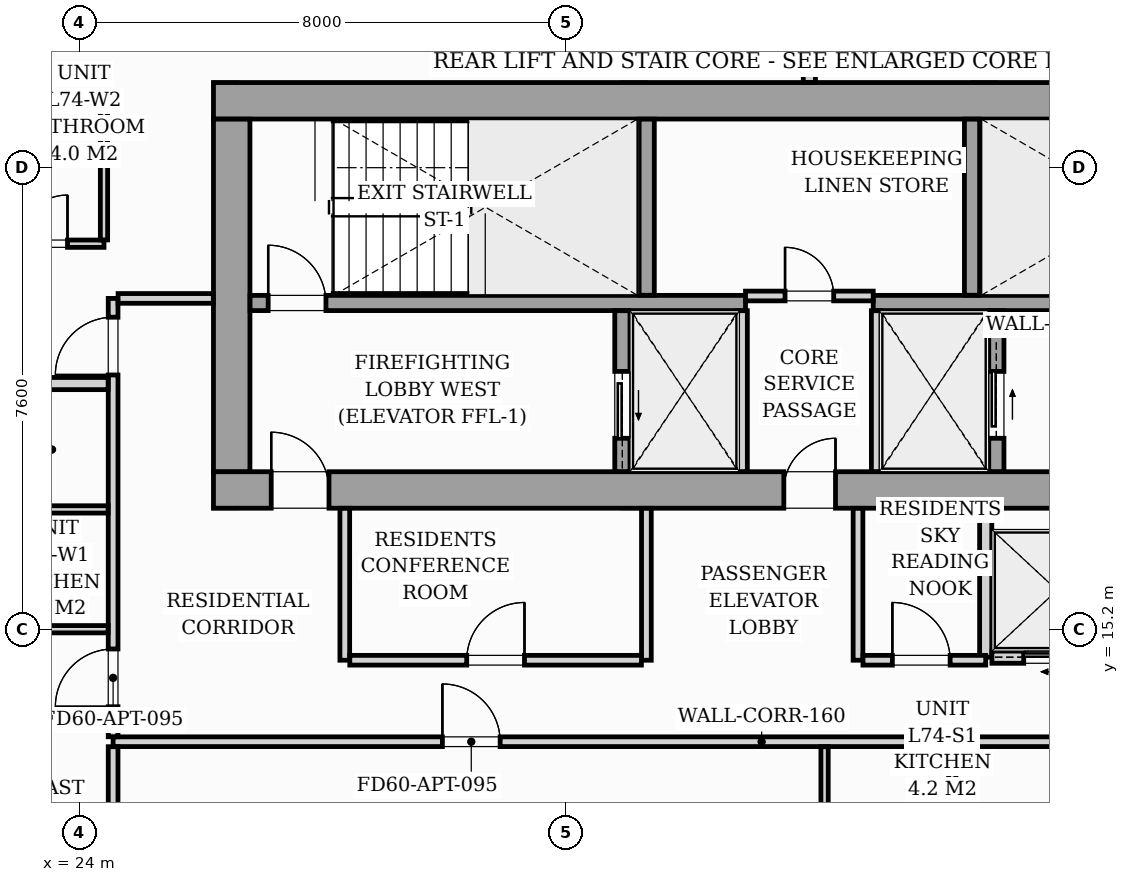
"""IFC4 building model, lengths in metres.
Left out: names, types, materials, properties, quantities, classifications, styles, units other than length and angle.
Written with IfcOpenShell. Run it as: python <this file> out.ifc"""

import sys

from ifc_helpers import new_model, si_unit, direction, frame, frame_2d, origin, origin_2d, place, context, subcontext, project, spatial, rectangle, i_section, extrude, source, transform, mapped, element, fill, save


model = new_model("IFC4")
c1 = context("Model", 3, precision=1e-05, world=origin(), true_north=direction((0.0, 1.0)))
c2 = subcontext(c1, "Body", "Model", "MODEL_VIEW")
j1 = project(units=[si_unit("LENGTHUNIT", "METRE"), si_unit("PLANEANGLEUNIT", "RADIAN")], contexts=[c1])
p1 = place(None, origin())
s1 = spatial("IfcSite", under=j1, at=p1, CompositionType="ELEMENT")
p2 = place(p1, origin())
s2 = spatial("IfcBuilding", under=s1, at=p2, CompositionType="ELEMENT")
p3 = place(p2, frame((0.0, 0.0, 256.2)))
s3 = spatial("IfcBuildingStorey", under=s2, at=p3, CompositionType="ELEMENT", Elevation=256.2)
m1 = source(origin(), c2, "Body", "SweptSolid", [
    extrude(i_section(OverallWidth=0.409, OverallDepth=0.425, WebThickness=0.033, FlangeThickness=0.052, FilletRadius=0.018, at=origin_2d()), origin(), (0.0, 0.0, 1.0), 3.296),
])
for number, where, z_axis, x_axis in (
    (1, (26.4, 17.4, 0.002), (0.0, 0.0, 1.0), (1.0, 0.0, 0.0)),
    (2, (33.12, 17.4, 0.002), (0.0, 0.0, 1.0), (1.0, 0.0, 0.0)),
    (3, (38.88, 17.4, 0.002), (0.0, 0.0, 1.0), (1.0, 0.0, 0.0)),
    (4, (26.4, 24.0, 0.002), (0.0, 0.0, 1.0), (1.0, 0.0, 0.0)),
    (5, (33.12, 24.0, 0.002), (0.0, 0.0, 1.0), (1.0, 0.0, 0.0)),
    (6, (38.88, 24.0, 0.002), (0.0, 0.0, 1.0), (1.0, 0.0, 0.0)),
):
    element("IfcColumn", number, at=place(p3, frame(where, z_axis=z_axis, x_axis=x_axis)), inside=s3, PredefinedType="PILASTER", context=c2, shape_type="MappedRepresentation", body=[
        mapped(m1, transform((0.0, 0.0, 0.0), scale=1.0)),
    ])
p4 = place(p3, frame((26.2, 17.5, 0.0), z_axis=(0.0, 0.0, 1.0), x_axis=(1.0, 0.0, 0.0)))
e7 = element("IfcWall", 7, at=p4, inside=s3, PredefinedType="SHEAR", context=c2, shape_type="SweptSolid", body=[
    extrude(rectangle(XDim=19.6, YDim=0.6, at=frame_2d((9.8, 0.0))), origin(), (0.0, 0.0, 1.0), 3.3),
])
p5 = place(p4, frame((0.95, 0.0, 0.0)))
e8 = element("IfcOpeningElement", 8, at=p5, cuts=e7, PredefinedType="OPENING", context=c2, shape_type="SweptSolid", body=[
    extrude(rectangle(XDim=0.95, YDim=2.06, at=frame_2d((0.475, 1.03))), frame((0.0, 0.31, 0.0), z_axis=(0.0, -1.0, 0.0), x_axis=(1.0, 0.0, 0.0)), (0.0, 0.0, 1.0), 0.62),
])
p6 = place(p4, frame((9.38, 0.0, 0.0)))
e9 = element("IfcOpeningElement", 9, at=p6, cuts=e7, PredefinedType="OPENING", context=c2, shape_type="SweptSolid", body=[
    extrude(rectangle(XDim=0.85, YDim=2.0, at=frame_2d((0.425, 1.0))), frame((0.0, 0.31, 0.0), z_axis=(0.0, -1.0, 0.0), x_axis=(1.0, 0.0, 0.0)), (0.0, 0.0, 1.0), 0.62),
])
p7 = place(p4, frame((17.55, 0.0, 0.0)))
e10 = element("IfcOpeningElement", 10, at=p7, cuts=e7, PredefinedType="OPENING", context=c2, shape_type="SweptSolid", body=[
    extrude(rectangle(XDim=0.95, YDim=2.06, at=frame_2d((0.475, 1.03))), frame((0.0, 0.31, 0.0), z_axis=(0.0, -1.0, 0.0), x_axis=(1.0, 0.0, 0.0)), (0.0, 0.0, 1.0), 0.62),
])
p8 = place(p3, frame((26.2, 23.9, 0.0), z_axis=(0.0, 0.0, 1.0), x_axis=(1.0, 0.0, 0.0)))
e11 = element("IfcWall", 11, at=p8, inside=s3, PredefinedType="SHEAR", context=c2, shape_type="SweptSolid", body=[
    extrude(rectangle(XDim=19.6, YDim=0.6, at=frame_2d((9.8, 0.0))), origin(), (0.0, 0.0, 1.0), 3.3),
])
p9 = place(p3, frame((26.5, 17.802, 0.0), z_axis=(0.0, 0.0, 1.0), x_axis=(0.0, 1.0, 0.0)))
e12 = element("IfcWall", 12, at=p9, inside=s3, PredefinedType="SHEAR", context=c2, shape_type="SweptSolid", body=[
    extrude(rectangle(XDim=5.796, YDim=0.6, at=frame_2d((2.898, 0.0))), origin(), (0.0, 0.0, 1.0), 3.3),
])
p10 = place(p3, frame((26.802, 20.575, 0.0), z_axis=(0.0, 0.0, 1.0), x_axis=(1.0, 0.0, 0.0)))
e13 = element("IfcWall", 13, at=p10, inside=s3, PredefinedType="SOLIDWALL", context=c2, shape_type="SweptSolid", body=[
    extrude(rectangle(XDim=8.148, YDim=0.25, at=frame_2d((4.074, 0.0))), origin(), (0.0, 0.0, 1.0), 3.3),
])
p11 = place(p10, frame((0.298, 0.0, 0.0)))
e14 = element("IfcOpeningElement", 14, at=p11, cuts=e13, PredefinedType="OPENING", context=c2, shape_type="SweptSolid", body=[
    extrude(rectangle(XDim=0.95, YDim=2.06, at=frame_2d((0.475, 1.03))), frame((0.0, 0.135, 0.0), z_axis=(0.0, -1.0, 0.0), x_axis=(1.0, 0.0, 0.0)), (0.0, 0.0, 1.0), 0.27),
])
p12 = place(p3, frame((37.05, 20.575, 0.0), z_axis=(0.0, 0.0, 1.0), x_axis=(1.0, 0.0, 0.0)))
e15 = element("IfcWall", 15, at=p12, inside=s3, PredefinedType="SOLIDWALL", context=c2, shape_type="SweptSolid", body=[
    extrude(rectangle(XDim=8.148, YDim=0.25, at=frame_2d((4.074, 0.0))), origin(), (0.0, 0.0, 1.0), 3.3),
])
p13 = place(p12, frame((6.6, 0.0, 0.0)))
e16 = element("IfcOpeningElement", 16, at=p13, cuts=e15, PredefinedType="OPENING", context=c2, shape_type="SweptSolid", body=[
    extrude(rectangle(XDim=0.95, YDim=2.06, at=frame_2d((0.475, 1.03))), frame((0.0, 0.135, 0.0), z_axis=(0.0, -1.0, 0.0), x_axis=(1.0, 0.0, 0.0)), (0.0, 0.0, 1.0), 0.27),
])
for number, where, z_axis, x_axis in (
    (17, (33.325, 20.702, 0.0), (0.0, 0.0, 1.0), (0.0, 1.0, 0.0)),
    (18, (38.675, 20.702, 0.0), (0.0, 0.0, 1.0), (0.0, 1.0, 0.0)),
):
    element("IfcWall", number, at=place(p3, frame(where, z_axis=z_axis, x_axis=x_axis)), inside=s3, PredefinedType="SOLIDWALL", context=c2, shape_type="SweptSolid", body=[
        extrude(rectangle(XDim=2.896, YDim=0.25, at=frame_2d((1.448, 0.0))), origin(), (0.0, 0.0, 1.0), 3.3),
    ])
p14 = place(p3, frame((32.925, 17.802, 0.0), z_axis=(0.0, 0.0, 1.0), x_axis=(0.0, 1.0, 0.0)))
e19 = element("IfcWall", 19, at=p14, inside=s3, PredefinedType="SOLIDWALL", context=c2, shape_type="SweptSolid", body=[
    extrude(rectangle(XDim=2.646, YDim=0.25, at=frame_2d((1.323, 0.0))), origin(), (0.0, 0.0, 1.0), 3.3),
])
p15 = place(p14, frame((0.548, 0.0, 0.0)))
e20 = element("IfcOpeningElement", 20, at=p15, cuts=e19, PredefinedType="OPENING", context=c2, shape_type="SweptSolid", body=[
    extrude(rectangle(XDim=1.1, YDim=2.08, at=frame_2d((0.55, 1.04))), frame((0.0, 0.135, 0.0), z_axis=(0.0, -1.0, 0.0), x_axis=(1.0, 0.0, 0.0)), (0.0, 0.0, 1.0), 0.27),
])
for number, where, z_axis, x_axis in (
    (21, (34.9, 17.802, 0.0), (0.0, 0.0, 1.0), (0.0, 1.0, 0.0)),
    (22, (37.1, 17.802, 0.0), (0.0, 0.0, 1.0), (0.0, 1.0, 0.0)),
):
    element("IfcWall", number, at=place(p3, frame(where, z_axis=z_axis, x_axis=x_axis)), inside=s3, PredefinedType="PARTITIONING", context=c2, shape_type="SweptSolid", body=[
        extrude(rectangle(XDim=2.646, YDim=0.16, at=frame_2d((1.323, 0.0))), origin(), (0.0, 0.0, 1.0), 3.0),
    ])
p16 = place(p3, frame((39.075, 17.802, 0.0), z_axis=(0.0, 0.0, 1.0), x_axis=(0.0, 1.0, 0.0)))
e23 = element("IfcWall", 23, at=p16, inside=s3, PredefinedType="SOLIDWALL", context=c2, shape_type="SweptSolid", body=[
    extrude(rectangle(XDim=2.646, YDim=0.25, at=frame_2d((1.323, 0.0))), origin(), (0.0, 0.0, 1.0), 3.3),
])
p17 = place(p16, frame((0.548, 0.0, 0.0)))
e24 = element("IfcOpeningElement", 24, at=p17, cuts=e23, PredefinedType="OPENING", context=c2, shape_type="SweptSolid", body=[
    extrude(rectangle(XDim=1.1, YDim=2.08, at=frame_2d((0.55, 1.04))), frame((0.0, 0.135, 0.0), z_axis=(0.0, -1.0, 0.0), x_axis=(1.0, 0.0, 0.0)), (0.0, 0.0, 1.0), 0.27),
])
p18 = place(p3, frame((34.95, 20.69, 0.0), z_axis=(0.0, 0.0, 1.0), x_axis=(1.0, 0.0, 0.0)))
e25 = element("IfcWall", 25, at=p18, inside=s3, PredefinedType="PARTITIONING", context=c2, shape_type="SweptSolid", body=[
    extrude(rectangle(XDim=2.1, YDim=0.16, at=frame_2d((1.05, 0.0))), origin(), (0.0, 0.0, 1.0), 3.0),
])
p19 = place(p18, frame((0.65, 0.0, 0.0)))
e26 = element("IfcOpeningElement", 26, at=p19, cuts=e25, PredefinedType="OPENING", context=c2, shape_type="SweptSolid", body=[
    extrude(rectangle(XDim=0.8, YDim=2.05, at=frame_2d((0.4, 1.025))), frame((0.0, 0.09, 0.0), z_axis=(0.0, -1.0, 0.0), x_axis=(1.0, 0.0, 0.0)), (0.0, 0.0, 1.0), 0.18),
])
p20 = place(p3, frame((38.9, 14.75, 0.0), z_axis=(0.0, 0.0, 1.0), x_axis=(0.0, 1.0, 0.0)))
e27 = element("IfcWall", 27, at=p20, inside=s3, PredefinedType="PARTITIONING", context=c2, shape_type="SweptSolid", body=[
    extrude(rectangle(XDim=2.35, YDim=0.2, at=frame_2d((1.175, 0.0))), origin(), (0.0, 0.0, 1.0), 3.0),
])
p21 = place(p3, frame((39.002, 14.75, 0.0), z_axis=(0.0, 0.0, 1.0), x_axis=(1.0, 0.0, 0.0)))
e28 = element("IfcWall", 28, at=p21, inside=s3, PredefinedType="PARTITIONING", context=c2, shape_type="SweptSolid", body=[
    extrude(rectangle(XDim=2.146, YDim=0.2, at=frame_2d((1.073, 0.0))), origin(), (0.0, 0.0, 1.0), 3.0),
])
p22 = place(p21, frame((0.523, 0.0, 0.0)))
e29 = element("IfcOpeningElement", 29, at=p22, cuts=e28, PredefinedType="OPENING", context=c2, shape_type="SweptSolid", body=[
    extrude(rectangle(XDim=1.05, YDim=2.08, at=frame_2d((0.525, 1.04))), frame((0.0, 0.11, 0.0), z_axis=(0.0, -1.0, 0.0), x_axis=(1.0, 0.0, 0.0)), (0.0, 0.0, 1.0), 0.22),
])
p23 = place(p3, frame((24.55, 13.36, 0.0), z_axis=(0.0, 0.0, 1.0), x_axis=(1.0, 0.0, 0.0)))
e30 = element("IfcWall", 30, at=p23, inside=s3, PredefinedType="PARTITIONING", context=c2, shape_type="SweptSolid", body=[
    extrude(rectangle(XDim=21.33, YDim=0.16, at=frame_2d((10.665, 0.0))), origin(), (0.0, 0.0, 1.0), 2.51),
])
p24 = place(p23, frame((5.415, 0.0, 0.0)))
e31 = element("IfcOpeningElement", 31, at=p24, cuts=e30, PredefinedType="OPENING", context=c2, shape_type="SweptSolid", body=[
    extrude(rectangle(XDim=0.95, YDim=2.06, at=frame_2d((0.475, 1.03))), frame((0.0, 0.09, 0.0), z_axis=(0.0, -1.0, 0.0), x_axis=(1.0, 0.0, 0.0)), (0.0, 0.0, 1.0), 0.18),
])
p25 = place(p3, frame((24.55, 10.077, 0.0), z_axis=(0.0, 0.0, 1.0), x_axis=(0.0, 1.0, 0.0)))
e32 = element("IfcWall", 32, at=p25, inside=s3, PredefinedType="PARTITIONING", context=c2, shape_type="SweptSolid", body=[
    extrude(rectangle(XDim=3.201, YDim=0.16, at=frame_2d((1.601, 0.0))), origin(), (0.0, 0.0, 1.0), 3.0),
])
p26 = place(p3, frame((24.55, 13.442, 0.0), z_axis=(0.0, 0.0, 1.0), x_axis=(0.0, 1.0, 0.0)))
e33 = element("IfcWall", 33, at=p26, inside=s3, PredefinedType="PARTITIONING", context=c2, shape_type="SweptSolid", body=[
    extrude(rectangle(XDim=7.208, YDim=0.16, at=frame_2d((3.604, 0.0))), origin(), (0.0, 0.0, 1.0), 3.0),
])
p27 = place(p26, frame((0.493, 0.0, 0.0)))
e34 = element("IfcOpeningElement", 34, at=p27, cuts=e33, PredefinedType="OPENING", context=c2, shape_type="SweptSolid", body=[
    extrude(rectangle(XDim=0.95, YDim=2.06, at=frame_2d((0.475, 1.03))), frame((0.0, 0.09, 0.0), z_axis=(0.0, -1.0, 0.0), x_axis=(1.0, 0.0, 0.0)), (0.0, 0.0, 1.0), 0.18),
])
p28 = place(p26, frame((5.949, 0.0, 0.0)))
e35 = element("IfcOpeningElement", 35, at=p28, cuts=e33, PredefinedType="OPENING", context=c2, shape_type="SweptSolid", body=[
    extrude(rectangle(XDim=0.95, YDim=2.06, at=frame_2d((0.475, 1.03))), frame((0.0, 0.09, 0.0), z_axis=(0.0, -1.0, 0.0), x_axis=(1.0, 0.0, 0.0)), (0.0, 0.0, 1.0), 0.18),
])
p29 = place(p3, frame((36.0, 24.202, 0.0), z_axis=(0.0, 0.0, 1.0), x_axis=(0.0, 1.0, 0.0)))
e36 = element("IfcWall", 36, at=p29, inside=s3, PredefinedType="PARTITIONING", context=c2, shape_type="SweptSolid", body=[
    extrude(rectangle(XDim=2.363, YDim=0.2, at=frame_2d((1.182, 0.0))), origin(), (0.0, 0.0, 1.0), 3.0),
])
p30 = place(p3, frame((24.632, 20.65, 0.0), z_axis=(0.0, 0.0, 1.0), x_axis=(1.0, 0.0, 0.0)))
e37 = element("IfcWall", 37, at=p30, inside=s3, PredefinedType="PARTITIONING", context=c2, shape_type="SweptSolid", body=[
    extrude(rectangle(XDim=1.566, YDim=0.16, at=frame_2d((0.783, 0.0))), origin(), (0.0, 0.0, 1.0), 3.0),
])
for number, where, z_axis, x_axis in (
    (38, (38.35, 11.172, 0.0), (0.0, 0.0, 1.0), (0.0, 1.0, 0.0)),
    (39, (36.25, 11.172, 0.0), (0.0, 0.0, 1.0), (0.0, 1.0, 0.0)),
):
    element("IfcWall", number, at=place(p3, frame(where, z_axis=z_axis, x_axis=x_axis)), inside=s3, PredefinedType="PARTITIONING", context=c2, shape_type="SweptSolid", body=[
        extrude(rectangle(XDim=2.106, YDim=0.12, at=frame_2d((1.053, 0.0))), origin(), (0.0, 0.0, 1.0), 3.0),
    ])
p31 = place(p3, frame((9.497, 19.25, 0.0), z_axis=(0.0, 0.0, 1.0), x_axis=(1.0, 0.0, 0.0)))
e40 = element("IfcWall", 40, at=p31, inside=s3, PredefinedType="PARTITIONING", context=c2, shape_type="SweptSolid", body=[
    extrude(rectangle(XDim=14.971, YDim=0.2, at=frame_2d((7.485, 0.0))), origin(), (0.0, 0.0, 1.0), 2.342),
])
for number, where, z_axis, x_axis in (
    (41, (22.212, 17.18, 0.0), (0.0, 0.0, 1.0), (1.0, 0.0, 0.0)),
    (42, (22.212, 15.21, 0.0), (0.0, 0.0, 1.0), (1.0, 0.0, 0.0)),
):
    element("IfcWall", number, at=place(p3, frame(where, z_axis=z_axis, x_axis=x_axis)), inside=s3, PredefinedType="PARTITIONING", context=c2, shape_type="SweptSolid", body=[
        extrude(rectangle(XDim=2.256, YDim=0.12, at=frame_2d((1.128, 0.0))), origin(), (0.0, 0.0, 1.0), 3.0),
    ])
p32 = place(p3, frame((20.2, 21.55, 0.0), z_axis=(0.0, 0.0, 1.0), x_axis=(1.0, 0.0, 0.0)))
e43 = element("IfcWall", 43, at=p32, inside=s3, PredefinedType="PARTITIONING", context=c2, shape_type="SweptSolid", body=[
    extrude(rectangle(XDim=4.2, YDim=0.12, at=frame_2d((2.1, 0.0))), origin(), (0.0, 0.0, 1.0), 3.0),
])
p33 = place(p32, frame((0.675, 0.0, 0.0)))
e44 = element("IfcOpeningElement", 44, at=p33, cuts=e43, PredefinedType="OPENING", context=c2, shape_type="SweptSolid", body=[
    extrude(rectangle(XDim=0.85, YDim=2.05, at=frame_2d((0.425, 1.025))), frame((0.0, 0.07, 0.0), z_axis=(0.0, -1.0, 0.0), x_axis=(1.0, 0.0, 0.0)), (0.0, 0.0, 1.0), 0.14),
])
p34 = place(p32, frame((2.8, 0.0, 0.0)))
e45 = element("IfcOpeningElement", 45, at=p34, cuts=e43, PredefinedType="OPENING", context=c2, shape_type="SweptSolid", body=[
    extrude(rectangle(XDim=0.8, YDim=2.02, at=frame_2d((0.4, 1.01))), frame((0.0, 0.07, 0.0), z_axis=(0.0, -1.0, 0.0), x_axis=(1.0, 0.0, 0.0)), (0.0, 0.0, 1.0), 0.14),
])
p35 = place(p3, frame((20.2, 23.8, 0.0), z_axis=(0.0, 0.0, 1.0), x_axis=(1.0, 0.0, 0.0)))
e46 = element("IfcWall", 46, at=p35, inside=s3, PredefinedType="PARTITIONING", context=c2, shape_type="SweptSolid", body=[
    extrude(rectangle(XDim=4.2, YDim=0.12, at=frame_2d((2.1, 0.0))), origin(), (0.0, 0.0, 1.0), 3.0),
])
p36 = place(p3, frame((24.4, 21.612, 0.0), z_axis=(0.0, 0.0, 1.0), x_axis=(0.0, 1.0, 0.0)))
e47 = element("IfcWall", 47, at=p36, inside=s3, PredefinedType="PARTITIONING", context=c2, shape_type="SweptSolid", body=[
    extrude(rectangle(XDim=2.126, YDim=0.12, at=frame_2d((1.063, 0.0))), origin(), (0.0, 0.0, 1.0), 3.0),
])
for number, where, z_axis, x_axis in (
    (48, (28.36, 14.7, 0.0), (0.0, 0.0, 1.0), (0.0, 1.0, 0.0)),
    (49, (33.32, 14.7, 0.0), (0.0, 0.0, 1.0), (0.0, 1.0, 0.0)),
):
    element("IfcWall", number, at=place(p3, frame(where, z_axis=z_axis, x_axis=x_axis)), inside=s3, PredefinedType="PARTITIONING", context=c2, shape_type="SweptSolid", body=[
        extrude(rectangle(XDim=2.498, YDim=0.16, at=frame_2d((1.249, 0.0))), origin(), (0.0, 0.0, 1.0), 3.0),
    ])
p37 = place(p3, frame((28.442, 14.7, 0.0), z_axis=(0.0, 0.0, 1.0), x_axis=(1.0, 0.0, 0.0)))
e50 = element("IfcWall", 50, at=p37, inside=s3, PredefinedType="PARTITIONING", context=c2, shape_type="SweptSolid", body=[
    extrude(rectangle(XDim=4.796, YDim=0.16, at=frame_2d((2.398, 0.0))), origin(), (0.0, 0.0, 1.0), 2.51),
])
p38 = place(p37, frame((1.923, 0.0, 0.0)))
e51 = element("IfcOpeningElement", 51, at=p38, cuts=e50, PredefinedType="OPENING", context=c2, shape_type="SweptSolid", body=[
    extrude(rectangle(XDim=0.95, YDim=2.06, at=frame_2d((0.475, 1.03))), frame((0.0, 0.09, 0.0), z_axis=(0.0, -1.0, 0.0), x_axis=(1.0, 0.0, 0.0)), (0.0, 0.0, 1.0), 0.18),
])
p39 = place(p3, frame((36.8, 14.7, 0.0), z_axis=(0.0, 0.0, 1.0), x_axis=(0.0, 1.0, 0.0)))
e52 = element("IfcWall", 52, at=p39, inside=s3, PredefinedType="PARTITIONING", context=c2, shape_type="SweptSolid", body=[
    extrude(rectangle(XDim=2.498, YDim=0.16, at=frame_2d((1.249, 0.0))), origin(), (0.0, 0.0, 1.0), 3.0),
])
p40 = place(p3, frame((36.882, 14.7, 0.0), z_axis=(0.0, 0.0, 1.0), x_axis=(1.0, 0.0, 0.0)))
e53 = element("IfcWall", 53, at=p40, inside=s3, PredefinedType="PARTITIONING", context=c2, shape_type="SweptSolid", body=[
    extrude(rectangle(XDim=2.018, YDim=0.16, at=frame_2d((1.009, 0.0))), origin(), (0.0, 0.0, 1.0), 3.0),
])
p41 = place(p40, frame((0.483, 0.0, 0.0)))
e54 = element("IfcOpeningElement", 54, at=p41, cuts=e53, PredefinedType="OPENING", context=c2, shape_type="SweptSolid", body=[
    extrude(rectangle(XDim=0.95, YDim=2.06, at=frame_2d((0.475, 1.03))), frame((0.0, 0.09, 0.0), z_axis=(0.0, -1.0, 0.0), x_axis=(1.0, 0.0, 0.0)), (0.0, 0.0, 1.0), 0.18),
])
m2 = source(origin(), c2, "Body", "SweptSolid", [
    extrude(rectangle(XDim=0.95, YDim=2.06, at=frame_2d((0.475, 1.03))), frame((0.0, 0.025, 0.0), z_axis=(0.0, -1.0, 0.0), x_axis=(1.0, 0.0, 0.0)), (0.0, 0.0, 1.0), 0.05),
])
p42 = place(p5, origin())
e55 = element("IfcDoor", 55, at=p42, inside=s3, OperationType="SINGLE_SWING_LEFT", PredefinedType="DOOR", context=c2, shape_type="MappedRepresentation", body=[
    mapped(m2, transform((0.0, 0.0, 0.0), scale=1.0)),
])
fill(e8, e55)
m3 = source(origin(), c2, "Body", "SweptSolid", [
    extrude(rectangle(XDim=0.85, YDim=2.0, at=frame_2d((0.425, 1.0))), frame((0.0, 0.025, 0.0), z_axis=(0.0, -1.0, 0.0), x_axis=(1.0, 0.0, 0.0)), (0.0, 0.0, 1.0), 0.05),
])
p43 = place(p6, origin())
e56 = element("IfcDoor", 56, at=p43, inside=s3, OperationType="SINGLE_SWING_RIGHT", PredefinedType="DOOR", context=c2, shape_type="MappedRepresentation", body=[
    mapped(m3, transform((0.0, 0.0, 0.0), scale=1.0)),
])
fill(e9, e56)
p44 = place(p11, origin())
e57 = element("IfcDoor", 57, at=p44, inside=s3, OperationType="SINGLE_SWING_LEFT", PredefinedType="DOOR", context=c2, shape_type="MappedRepresentation", body=[
    mapped(m2, transform((0.0, 0.0, 0.0), scale=1.0)),
])
fill(e14, e57)
m4 = source(origin(), c2, "Body", "SweptSolid", [
    extrude(rectangle(XDim=1.1, YDim=2.08, at=frame_2d((0.55, 1.04))), frame((0.0, 0.025, 0.0), z_axis=(0.0, -1.0, 0.0), x_axis=(1.0, 0.0, 0.0)), (0.0, 0.0, 1.0), 0.05),
])
p45 = place(p15, origin())
e58 = element("IfcDoor", 58, at=p45, inside=s3, OperationType="SLIDING_TO_LEFT", PredefinedType="DOOR", context=c2, shape_type="MappedRepresentation", body=[
    mapped(m4, transform((0.0, 0.0, 0.0), scale=1.0)),
])
fill(e20, e58)
p46 = place(p17, origin())
e59 = element("IfcDoor", 59, at=p46, inside=s3, OperationType="SLIDING_TO_RIGHT", PredefinedType="DOOR", context=c2, shape_type="MappedRepresentation", body=[
    mapped(m4, transform((0.0, 0.0, 0.0), scale=1.0)),
])
fill(e24, e59)
m5 = source(origin(), c2, "Body", "SweptSolid", [
    extrude(rectangle(XDim=0.8, YDim=2.05, at=frame_2d((0.4, 1.025))), frame((0.0, 0.025, 0.0), z_axis=(0.0, -1.0, 0.0), x_axis=(1.0, 0.0, 0.0)), (0.0, 0.0, 1.0), 0.05),
])
p47 = place(p19, origin())
e60 = element("IfcDoor", 60, at=p47, inside=s3, OperationType="SINGLE_SWING_LEFT", PredefinedType="DOOR", context=c2, shape_type="MappedRepresentation", body=[
    mapped(m5, transform((0.0, 0.0, 0.0), scale=1.0)),
])
fill(e26, e60)
m6 = source(origin(), c2, "Body", "SweptSolid", [
    extrude(rectangle(XDim=1.05, YDim=2.08, at=frame_2d((0.525, 1.04))), frame((0.0, 0.025, 0.0), z_axis=(0.0, -1.0, 0.0), x_axis=(1.0, 0.0, 0.0)), (0.0, 0.0, 1.0), 0.05),
])
p48 = place(p22, origin())
e61 = element("IfcDoor", 61, at=p48, inside=s3, OperationType="SLIDING_TO_LEFT", PredefinedType="DOOR", context=c2, shape_type="MappedRepresentation", body=[
    mapped(m6, transform((0.0, 0.0, 0.0), scale=1.0)),
])
fill(e29, e61)
m7 = source(origin(), c2, "Body", "SweptSolid", [
    extrude(rectangle(XDim=0.95, YDim=2.06, at=frame_2d((0.475, 1.03))), frame((0.0, 0.025, 0.0), z_axis=(0.0, -1.0, 0.0), x_axis=(1.0, 0.0, 0.0)), (0.0, 0.0, 1.0), 0.05),
])
p49 = place(p24, origin())
e62 = element("IfcDoor", 62, at=p49, inside=s3, OperationType="SINGLE_SWING_LEFT", PredefinedType="DOOR", context=c2, shape_type="MappedRepresentation", body=[
    mapped(m7, transform((0.0, 0.0, 0.0), scale=1.0)),
])
fill(e31, e62)
p50 = place(p27, origin())
e63 = element("IfcDoor", 63, at=p50, inside=s3, OperationType="SINGLE_SWING_LEFT", PredefinedType="DOOR", context=c2, shape_type="MappedRepresentation", body=[
    mapped(m7, transform((0.0, 0.0, 0.0), scale=1.0)),
])
fill(e34, e63)
p51 = place(p28, origin())
e64 = element("IfcDoor", 64, at=p51, inside=s3, OperationType="SINGLE_SWING_LEFT", PredefinedType="DOOR", context=c2, shape_type="MappedRepresentation", body=[
    mapped(m7, transform((0.0, 0.0, 0.0), scale=1.0)),
])
fill(e35, e64)
m8 = source(origin(), c2, "Body", "SweptSolid", [
    extrude(rectangle(XDim=0.8, YDim=2.02, at=frame_2d((0.4, 1.01))), frame((0.0, 0.025, 0.0), z_axis=(0.0, -1.0, 0.0), x_axis=(1.0, 0.0, 0.0)), (0.0, 0.0, 1.0), 0.05),
])
p52 = place(p34, origin())
e65 = element("IfcDoor", 65, at=p52, inside=s3, OperationType="SINGLE_SWING_RIGHT", PredefinedType="DOOR", context=c2, shape_type="MappedRepresentation", body=[
    mapped(m8, transform((0.0, 0.0, 0.0), scale=1.0)),
])
fill(e45, e65)
p53 = place(p38, origin())
e66 = element("IfcDoor", 66, at=p53, inside=s3, OperationType="SINGLE_SWING_RIGHT", PredefinedType="DOOR", context=c2, shape_type="MappedRepresentation", body=[
    mapped(m7, transform((0.0, 0.0, 0.0), scale=1.0)),
])
fill(e51, e66)
p54 = place(p41, origin())
e67 = element("IfcDoor", 67, at=p54, inside=s3, OperationType="SINGLE_SWING_LEFT", PredefinedType="DOOR", context=c2, shape_type="MappedRepresentation", body=[
    mapped(m7, transform((0.0, 0.0, 0.0), scale=1.0)),
])
fill(e54, e67)
save(model, sys.argv[1])
